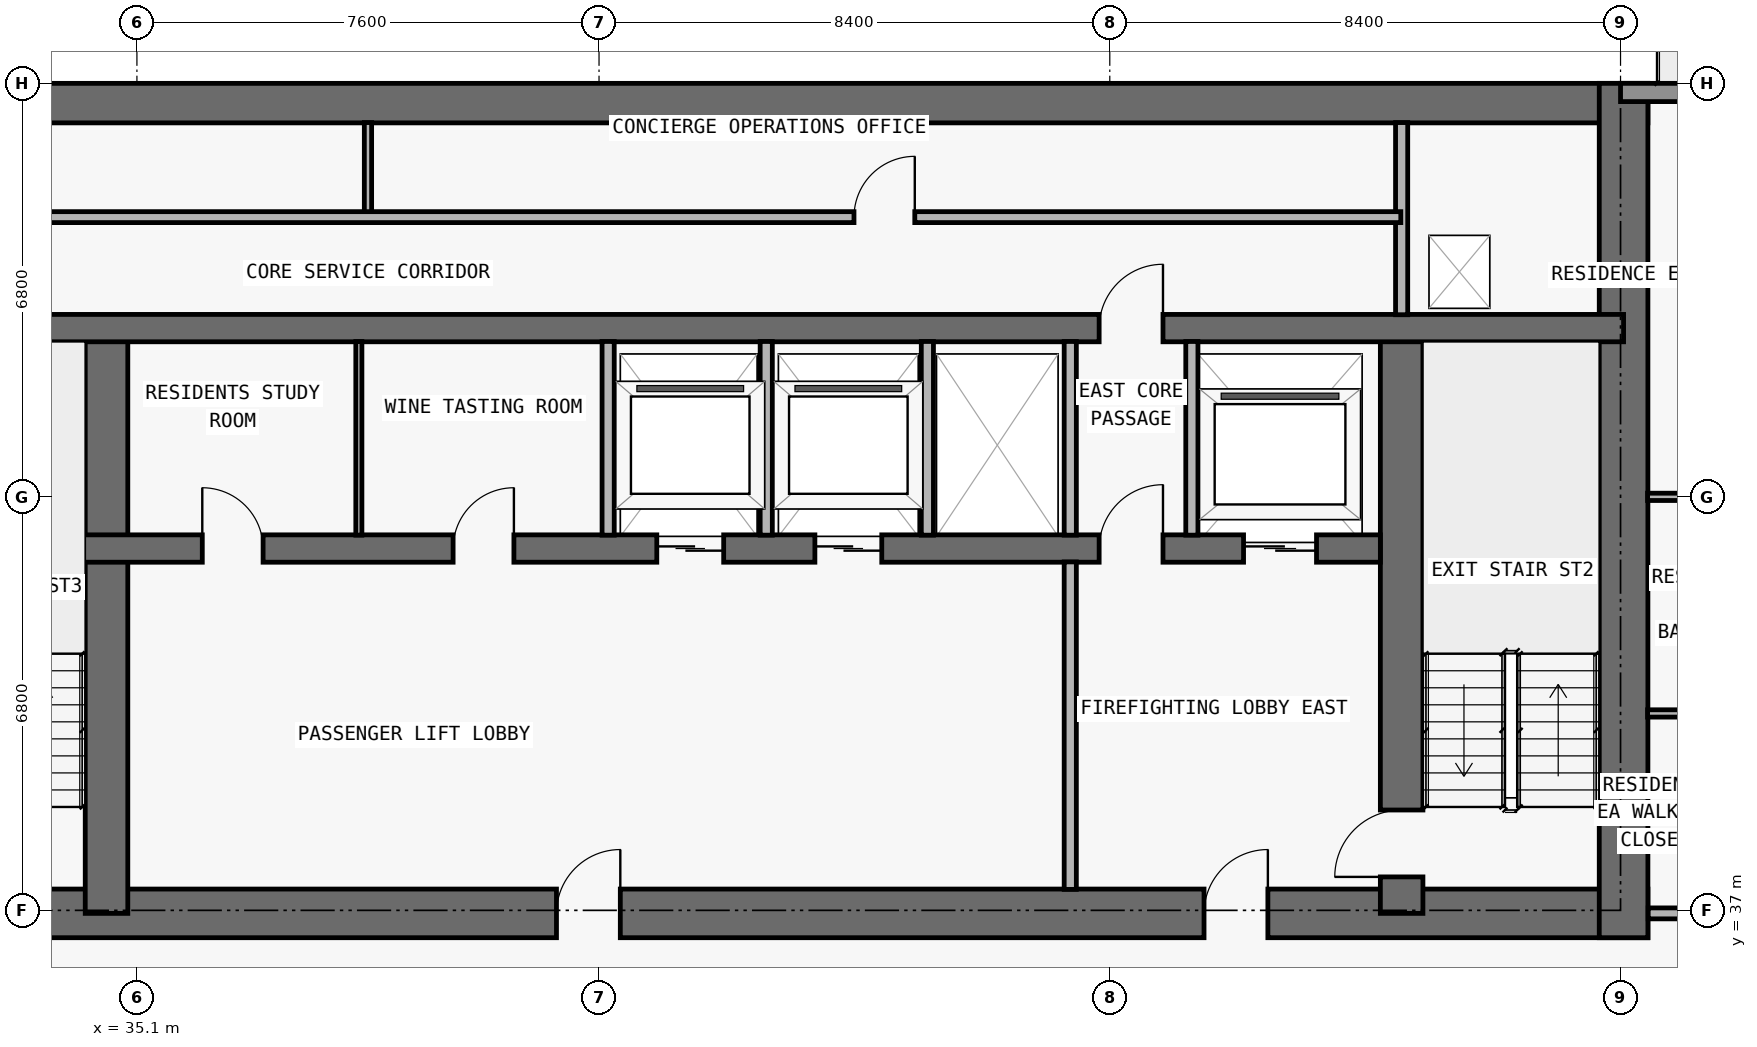
"""IFC4 building model, lengths in metres.
Left out: names, types, materials, properties, quantities, classifications, styles, units other than length and angle.
Written with IfcOpenShell. Run it as: python <this file> out.ifc"""

import sys

from ifc_helpers import new_model, si_unit, direction, frame, frame_2d, origin, place, context, subcontext, project, spatial, rectangle, extrude, element, fill, save


model = new_model("IFC4")
c1 = context("Model", 3, precision=1e-05, world=origin(), true_north=direction((0.0, 1.0)))
c2 = subcontext(c1, "Body", "Model", "MODEL_VIEW")
j1 = project(units=[si_unit("LENGTHUNIT", "METRE"), si_unit("PLANEANGLEUNIT", "RADIAN")], contexts=[c1])
p1 = place(None, origin())
s1 = spatial("IfcSite", under=j1, at=p1, CompositionType="ELEMENT")
p2 = place(p1, origin())
s2 = spatial("IfcBuilding", under=s1, at=p2, CompositionType="ELEMENT")
p3 = place(p2, frame((0.0, 0.0, 132.3)))
s3 = spatial("IfcBuildingStorey", under=s2, at=p3, CompositionType="ELEMENT", Elevation=132.3)
p4 = place(p3, frame((17.85, 36.95, 0.0), z_axis=(0.0, 0.0, 1.0), x_axis=(1.0, 0.0, 0.0)))
e1 = element("IfcWall", 1, at=p4, inside=s3, PredefinedType="SHEAR", context=c2, shape_type="SweptSolid", body=[
    extrude(rectangle(XDim=42.1, YDim=0.8, at=frame_2d((21.05, 0.0))), origin(), (0.0, 0.0, 1.0), 3.05),
])
p5 = place(p4, frame((14.45, 0.0, 0.0)))
e2 = element("IfcOpeningElement", 2, at=p5, cuts=e1, PredefinedType="OPENING", context=c2, shape_type="SweptSolid", body=[
    extrude(rectangle(XDim=1.1, YDim=2.15, at=frame_2d((0.55, 1.075))), frame((0.0, 0.41, 0.0), z_axis=(0.0, -1.0, 0.0), x_axis=(1.0, 0.0, 0.0)), (0.0, 0.0, 1.0), 0.82),
])
p6 = place(p4, frame((6.3, 0.0, 0.0)))
e3 = element("IfcOpeningElement", 3, at=p6, cuts=e1, PredefinedType="OPENING", context=c2, shape_type="SweptSolid", body=[
    extrude(rectangle(XDim=1.05, YDim=2.15, at=frame_2d((0.525, 1.075))), frame((0.0, 0.41, 0.0), z_axis=(0.0, -1.0, 0.0), x_axis=(1.0, 0.0, 0.0)), (0.0, 0.0, 1.0), 0.82),
])
p7 = place(p4, frame((34.8, 0.0, 0.0)))
e4 = element("IfcOpeningElement", 4, at=p7, cuts=e1, PredefinedType="OPENING", context=c2, shape_type="SweptSolid", body=[
    extrude(rectangle(XDim=1.05, YDim=2.15, at=frame_2d((0.525, 1.075))), frame((0.0, 0.41, 0.0), z_axis=(0.0, -1.0, 0.0), x_axis=(1.0, 0.0, 0.0)), (0.0, 0.0, 1.0), 0.82),
])
p8 = place(p4, frame((10.913, 0.0, 0.0)))
e5 = element("IfcOpeningElement", 5, at=p8, cuts=e1, PredefinedType="OPENING", context=c2, shape_type="SweptSolid", body=[
    extrude(rectangle(XDim=1.05, YDim=2.15, at=frame_2d((0.525, 1.075))), frame((0.0, 0.41, 0.0), z_axis=(0.0, -1.0, 0.0), x_axis=(1.0, 0.0, 0.0)), (0.0, 0.0, 1.0), 0.82),
])
p9 = place(p4, frame((24.15, 0.0, 0.0)))
e6 = element("IfcOpeningElement", 6, at=p9, cuts=e1, PredefinedType="OPENING", context=c2, shape_type="SweptSolid", body=[
    extrude(rectangle(XDim=1.05, YDim=2.15, at=frame_2d((0.525, 1.075))), frame((0.0, 0.41, 0.0), z_axis=(0.0, -1.0, 0.0), x_axis=(1.0, 0.0, 0.0)), (0.0, 0.0, 1.0), 0.82),
])
p10 = place(p3, frame((17.85, 50.275, 0.0), z_axis=(0.0, 0.0, 1.0), x_axis=(1.0, 0.0, 0.0)))
e7 = element("IfcWall", 7, at=p10, inside=s3, PredefinedType="SHEAR", context=c2, shape_type="SweptSolid", body=[
    extrude(rectangle(XDim=42.1, YDim=0.65, at=frame_2d((21.05, 0.0))), origin(), (0.0, 0.0, 1.0), 3.05),
])
p11 = place(p3, frame((59.55, 36.55, 0.0), z_axis=(0.0, 0.0, 1.0), x_axis=(0.0, 1.0, 0.0)))
e8 = element("IfcWall", 8, at=p11, inside=s3, PredefinedType="SHEAR", context=c2, shape_type="SweptSolid", body=[
    extrude(rectangle(XDim=14.05, YDim=0.8, at=frame_2d((7.025, 0.0))), origin(), (0.0, 0.0, 1.0), 3.05),
])
p12 = place(p3, frame((55.9, 36.95, 0.0), z_axis=(0.0, 0.0, 1.0), x_axis=(0.0, 1.0, 0.0)))
e9 = element("IfcWall", 9, at=p12, inside=s3, PredefinedType="SHEAR", context=c2, shape_type="SweptSolid", body=[
    extrude(rectangle(XDim=9.625, YDim=0.7, at=frame_2d((4.812, 0.0))), origin(), (0.0, 0.0, 1.0), 3.05),
])
p13 = place(p12, frame((0.6, 0.0, 0.0)))
e10 = element("IfcOpeningElement", 10, at=p13, cuts=e9, PredefinedType="OPENING", context=c2, shape_type="SweptSolid", body=[
    extrude(rectangle(XDim=1.1, YDim=2.15, at=frame_2d((0.55, 1.075))), frame((0.0, 0.36, 0.0), z_axis=(0.0, -1.0, 0.0), x_axis=(1.0, 0.0, 0.0)), (0.0, 0.0, 1.0), 0.72),
])
p14 = place(p3, frame((34.6, 36.95, 0.0), z_axis=(0.0, 0.0, 1.0), x_axis=(0.0, 1.0, 0.0)))
e11 = element("IfcWall", 11, at=p14, inside=s3, PredefinedType="SHEAR", context=c2, shape_type="SweptSolid", body=[
    extrude(rectangle(XDim=9.625, YDim=0.7, at=frame_2d((4.812, 0.0))), origin(), (0.0, 0.0, 1.0), 3.05),
])
p15 = place(p3, frame((22.25, 42.95, 0.0), z_axis=(0.0, 0.0, 1.0), x_axis=(1.0, 0.0, 0.0)))
e12 = element("IfcWall", 12, at=p15, inside=s3, PredefinedType="SHEAR", context=c2, shape_type="SweptSolid", body=[
    extrude(rectangle(XDim=33.3, YDim=0.45, at=frame_2d((16.65, 0.0))), origin(), (0.0, 0.0, 1.0), 3.05),
])
p16 = place(p15, frame((1.05, 0.0, 0.0)))
e13 = element("IfcOpeningElement", 13, at=p16, cuts=e12, PredefinedType="OPENING", context=c2, shape_type="SweptSolid", body=[
    extrude(rectangle(XDim=1.2, YDim=2.2, at=frame_2d((0.6, 1.1))), frame((0.0, 0.235, 0.0), z_axis=(0.0, -1.0, 0.0), x_axis=(1.0, 0.0, 0.0)), (0.0, 0.0, 1.0), 0.47),
])
p17 = place(p15, frame((31.05, 0.0, 0.0)))
e14 = element("IfcOpeningElement", 14, at=p17, cuts=e12, PredefinedType="OPENING", context=c2, shape_type="SweptSolid", body=[
    extrude(rectangle(XDim=1.2, YDim=2.2, at=frame_2d((0.6, 1.1))), frame((0.0, 0.235, 0.0), z_axis=(0.0, -1.0, 0.0), x_axis=(1.0, 0.0, 0.0)), (0.0, 0.0, 1.0), 0.47),
])
p18 = place(p15, frame((21.4, 0.0, 0.0)))
e15 = element("IfcOpeningElement", 15, at=p18, cuts=e12, PredefinedType="OPENING", context=c2, shape_type="SweptSolid", body=[
    extrude(rectangle(XDim=1.1, YDim=2.2, at=frame_2d((0.55, 1.1))), frame((0.0, 0.235, 0.0), z_axis=(0.0, -1.0, 0.0), x_axis=(1.0, 0.0, 0.0)), (0.0, 0.0, 1.0), 0.47),
])
p19 = place(p15, frame((24.0, 0.0, 0.0)))
e16 = element("IfcOpeningElement", 16, at=p19, cuts=e12, PredefinedType="OPENING", context=c2, shape_type="SweptSolid", body=[
    extrude(rectangle(XDim=1.1, YDim=2.2, at=frame_2d((0.55, 1.1))), frame((0.0, 0.235, 0.0), z_axis=(0.0, -1.0, 0.0), x_axis=(1.0, 0.0, 0.0)), (0.0, 0.0, 1.0), 0.47),
])
p20 = place(p15, frame((3.625, 0.0, 0.0)))
e17 = element("IfcOpeningElement", 17, at=p20, cuts=e12, PredefinedType="OPENING", context=c2, shape_type="SweptSolid", body=[
    extrude(rectangle(XDim=1.05, YDim=2.15, at=frame_2d((0.525, 1.075))), frame((0.0, 0.235, 0.0), z_axis=(0.0, -1.0, 0.0), x_axis=(1.0, 0.0, 0.0)), (0.0, 0.0, 1.0), 0.47),
])
p21 = place(p15, frame((28.675, 0.0, 0.0)))
e18 = element("IfcOpeningElement", 18, at=p21, cuts=e12, PredefinedType="OPENING", context=c2, shape_type="SweptSolid", body=[
    extrude(rectangle(XDim=1.05, YDim=2.15, at=frame_2d((0.525, 1.075))), frame((0.0, 0.235, 0.0), z_axis=(0.0, -1.0, 0.0), x_axis=(1.0, 0.0, 0.0)), (0.0, 0.0, 1.0), 0.47),
])
p22 = place(p15, frame((13.925, 0.0, 0.0)))
e19 = element("IfcOpeningElement", 19, at=p22, cuts=e12, PredefinedType="OPENING", context=c2, shape_type="SweptSolid", body=[
    extrude(rectangle(XDim=1.0, YDim=2.2, at=frame_2d((0.5, 1.1))), frame((0.0, 0.235, 0.0), z_axis=(0.0, -1.0, 0.0), x_axis=(1.0, 0.0, 0.0)), (0.0, 0.0, 1.0), 0.47),
])
p23 = place(p15, frame((18.05, 0.0, 0.0)))
e20 = element("IfcOpeningElement", 20, at=p23, cuts=e12, PredefinedType="OPENING", context=c2, shape_type="SweptSolid", body=[
    extrude(rectangle(XDim=1.0, YDim=2.2, at=frame_2d((0.5, 1.1))), frame((0.0, 0.235, 0.0), z_axis=(0.0, -1.0, 0.0), x_axis=(1.0, 0.0, 0.0)), (0.0, 0.0, 1.0), 0.47),
])
p24 = place(p3, frame((18.25, 46.575, 0.0), z_axis=(0.0, 0.0, 1.0), x_axis=(1.0, 0.0, 0.0)))
e21 = element("IfcWall", 21, at=p24, inside=s3, PredefinedType="SHEAR", context=c2, shape_type="SweptSolid", body=[
    extrude(rectangle(XDim=41.3, YDim=0.45, at=frame_2d((20.65, 0.0))), origin(), (0.0, 0.0, 1.0), 3.05),
])
p25 = place(p24, frame((7.625, 0.0, 0.0)))
e22 = element("IfcOpeningElement", 22, at=p25, cuts=e21, PredefinedType="OPENING", context=c2, shape_type="SweptSolid", body=[
    extrude(rectangle(XDim=1.05, YDim=2.15, at=frame_2d((0.525, 1.075))), frame((0.0, 0.235, 0.0), z_axis=(0.0, -1.0, 0.0), x_axis=(1.0, 0.0, 0.0)), (0.0, 0.0, 1.0), 0.47),
])
p26 = place(p24, frame((32.675, 0.0, 0.0)))
e23 = element("IfcOpeningElement", 23, at=p26, cuts=e21, PredefinedType="OPENING", context=c2, shape_type="SweptSolid", body=[
    extrude(rectangle(XDim=1.05, YDim=2.15, at=frame_2d((0.525, 1.075))), frame((0.0, 0.235, 0.0), z_axis=(0.0, -1.0, 0.0), x_axis=(1.0, 0.0, 0.0)), (0.0, 0.0, 1.0), 0.47),
])
p27 = place(p3, frame((59.5, 50.45, 0.0), z_axis=(0.0, 0.0, 1.0), x_axis=(1.0, 0.0, 0.0)))
e24 = element("IfcWall", 24, at=p27, inside=s3, PredefinedType="STANDARD", context=c2, shape_type="SweptSolid", body=[
    extrude(rectangle(XDim=10.6, YDim=0.3, at=frame_2d((5.3, 0.0))), origin(), (0.0, 0.0, 1.0), 3.05),
])
p28 = place(p27, frame((4.3, 0.0, 0.0)))
e25 = element("IfcOpeningElement", 25, at=p28, cuts=e24, PredefinedType="OPENING", context=c2, shape_type="SweptSolid", body=[
    extrude(rectangle(XDim=2.0, YDim=2.3, at=frame_2d((1.0, 1.15))), frame((0.0, 0.16, 0.0), z_axis=(0.0, -1.0, 0.0), x_axis=(1.0, 0.0, 0.0)), (0.0, 0.0, 1.0), 0.32),
])
p29 = place(p3, frame((38.75, 43.17, 0.0), z_axis=(0.0, 0.0, 1.0), x_axis=(0.0, 1.0, 0.0)))
e26 = element("IfcWall", 26, at=p29, inside=s3, PredefinedType="MOVABLE", context=c2, shape_type="SweptSolid", body=[
    extrude(rectangle(XDim=3.185, YDim=0.1, at=frame_2d((1.593, 0.0))), origin(), (0.0, 0.0, 1.0), 3.05),
])
p30 = place(p3, frame((38.9, 48.4, 0.0), z_axis=(0.0, 0.0, 1.0), x_axis=(0.0, 1.0, 0.0)))
e27 = element("IfcWall", 27, at=p30, inside=s3, PredefinedType="PARTITIONING", context=c2, shape_type="SweptSolid", body=[
    extrude(rectangle(XDim=1.555, YDim=0.12, at=frame_2d((0.778, 0.0))), origin(), (0.0, 0.0, 1.0), 3.05),
])
for number, where, z_axis, x_axis in (
    (28, (42.85, 43.17, 0.0), (0.0, 0.0, 1.0), (0.0, 1.0, 0.0)),
    (29, (45.45, 43.17, 0.0), (0.0, 0.0, 1.0), (0.0, 1.0, 0.0)),
    (30, (48.1, 43.17, 0.0), (0.0, 0.0, 1.0), (0.0, 1.0, 0.0)),
):
    element("IfcWall", number, at=place(p3, frame(where, z_axis=z_axis, x_axis=x_axis)), inside=s3, PredefinedType="PARTITIONING", context=c2, shape_type="SweptSolid", body=[
        extrude(rectangle(XDim=3.185, YDim=0.2, at=frame_2d((1.593, 0.0))), origin(), (0.0, 0.0, 1.0), 3.05),
    ])
p31 = place(p3, frame((50.45, 37.345, 0.0), z_axis=(0.0, 0.0, 1.0), x_axis=(0.0, 1.0, 0.0)))
e31 = element("IfcWall", 31, at=p31, inside=s3, PredefinedType="PARTITIONING", context=c2, shape_type="SweptSolid", body=[
    extrude(rectangle(XDim=5.385, YDim=0.2, at=frame_2d((2.692, 0.0))), origin(), (0.0, 0.0, 1.0), 3.05),
])
for number, where, z_axis, x_axis in (
    (32, (50.45, 43.17, 0.0), (0.0, 0.0, 1.0), (0.0, 1.0, 0.0)),
    (33, (52.45, 43.17, 0.0), (0.0, 0.0, 1.0), (0.0, 1.0, 0.0)),
):
    element("IfcWall", number, at=place(p3, frame(where, z_axis=z_axis, x_axis=x_axis)), inside=s3, PredefinedType="PARTITIONING", context=c2, shape_type="SweptSolid", body=[
        extrude(rectangle(XDim=3.185, YDim=0.2, at=frame_2d((1.593, 0.0))), origin(), (0.0, 0.0, 1.0), 3.05),
    ])
p32 = place(p3, frame((55.9, 46.795, 0.0), z_axis=(0.0, 0.0, 1.0), x_axis=(0.0, 1.0, 0.0)))
e34 = element("IfcWall", 34, at=p32, inside=s3, PredefinedType="PARTITIONING", context=c2, shape_type="SweptSolid", body=[
    extrude(rectangle(XDim=3.16, YDim=0.2, at=frame_2d((1.58, 0.0))), origin(), (0.0, 0.0, 1.0), 3.05),
])
p33 = place(p3, frame((59.955, 36.95, 0.0), z_axis=(0.0, 0.0, 1.0), x_axis=(1.0, 0.0, 0.0)))
e35 = element("IfcWall", 35, at=p33, inside=s3, PredefinedType="PARTITIONING", context=c2, shape_type="SweptSolid", body=[
    extrude(rectangle(XDim=10.145, YDim=0.18, at=frame_2d((5.073, 0.0))), origin(), (0.0, 0.0, 1.0), 3.05),
])
p34 = place(p33, frame((3.957, 0.0, 0.0)))
e36 = element("IfcOpeningElement", 36, at=p34, cuts=e35, PredefinedType="OPENING", context=c2, shape_type="SweptSolid", body=[
    extrude(rectangle(XDim=1.0, YDim=2.2, at=frame_2d((0.5, 1.1))), frame((0.0, 0.1, 0.0), z_axis=(0.0, -1.0, 0.0), x_axis=(1.0, 0.0, 0.0)), (0.0, 0.0, 1.0), 0.2),
])
p35 = place(p3, frame((59.945, 40.238, 0.0), z_axis=(0.0, 0.0, 1.0), x_axis=(1.0, 0.0, 0.0)))
e37 = element("IfcWall", 37, at=p35, inside=s3, PredefinedType="PARTITIONING", context=c2, shape_type="SweptSolid", body=[
    extrude(rectangle(XDim=2.255, YDim=0.12, at=frame_2d((1.127, 0.0))), origin(), (0.0, 0.0, 1.0), 3.05),
])
p36 = place(p3, frame((59.945, 43.8, 0.0), z_axis=(0.0, 0.0, 1.0), x_axis=(1.0, 0.0, 0.0)))
e38 = element("IfcWall", 38, at=p36, inside=s3, PredefinedType="PARTITIONING", context=c2, shape_type="SweptSolid", body=[
    extrude(rectangle(XDim=13.66, YDim=0.12, at=frame_2d((6.83, 0.0))), origin(), (0.0, 0.0, 1.0), 2.339),
])
p37 = place(p36, frame((4.017, 0.0, 0.0)))
e39 = element("IfcOpeningElement", 39, at=p37, cuts=e38, PredefinedType="OPENING", context=c2, shape_type="SweptSolid", body=[
    extrude(rectangle(XDim=0.9, YDim=2.15, at=frame_2d((0.45, 1.075))), frame((0.0, 0.07, 0.0), z_axis=(0.0, -1.0, 0.0), x_axis=(1.0, 0.0, 0.0)), (0.0, 0.0, 1.0), 0.14),
])
p38 = place(p36, frame((0.702, 0.0, 0.0)))
e40 = element("IfcOpeningElement", 40, at=p38, cuts=e38, PredefinedType="OPENING", context=c2, shape_type="SweptSolid", body=[
    extrude(rectangle(XDim=0.85, YDim=2.1, at=frame_2d((0.425, 1.05))), frame((0.0, 0.07, 0.0), z_axis=(0.0, -1.0, 0.0), x_axis=(1.0, 0.0, 0.0)), (0.0, 0.0, 1.0), 0.14),
])
p39 = place(p3, frame((21.9, 48.4, 0.0), z_axis=(0.0, 0.0, 1.0), x_axis=(1.0, 0.0, 0.0)))
e41 = element("IfcWall", 41, at=p39, inside=s3, PredefinedType="PARTITIONING", context=c2, shape_type="SweptSolid", body=[
    extrude(rectangle(XDim=33.986, YDim=0.18, at=frame_2d((16.993, 0.0))), origin(), (0.0, 0.0, 1.0), 3.05),
])
p40 = place(p39, frame((8.0, 0.0, 0.0)))
e42 = element("IfcOpeningElement", 42, at=p40, cuts=e41, PredefinedType="OPENING", context=c2, shape_type="SweptSolid", body=[
    extrude(rectangle(XDim=1.0, YDim=2.2, at=frame_2d((0.5, 1.1))), frame((0.0, 0.1, 0.0), z_axis=(0.0, -1.0, 0.0), x_axis=(1.0, 0.0, 0.0)), (0.0, 0.0, 1.0), 0.2),
])
p41 = place(p39, frame((24.993, 0.0, 0.0)))
e43 = element("IfcOpeningElement", 43, at=p41, cuts=e41, PredefinedType="OPENING", context=c2, shape_type="SweptSolid", body=[
    extrude(rectangle(XDim=1.0, YDim=2.2, at=frame_2d((0.5, 1.1))), frame((0.0, 0.1, 0.0), z_axis=(0.0, -1.0, 0.0), x_axis=(1.0, 0.0, 0.0)), (0.0, 0.0, 1.0), 0.2),
])
p42 = place(p17, origin())
e44 = element("IfcDoor", 44, at=p42, inside=s3, OperationType="DOUBLE_DOOR_SLIDING", PredefinedType="DOOR", context=c2, shape_type="SweptSolid", body=[
    extrude(rectangle(XDim=1.2, YDim=2.2, at=frame_2d((0.6, 1.1))), frame((0.0, 0.025, 0.0), z_axis=(0.0, -1.0, 0.0), x_axis=(1.0, 0.0, 0.0)), (0.0, 0.0, 1.0), 0.05),
])
fill(e14, e44)
p43 = place(p18, origin())
e45 = element("IfcDoor", 45, at=p43, inside=s3, OperationType="DOUBLE_DOOR_SLIDING", PredefinedType="DOOR", context=c2, shape_type="SweptSolid", body=[
    extrude(rectangle(XDim=1.1, YDim=2.2, at=frame_2d((0.55, 1.1))), frame((0.0, 0.025, 0.0), z_axis=(0.0, -1.0, 0.0), x_axis=(1.0, 0.0, 0.0)), (0.0, 0.0, 1.0), 0.05),
])
fill(e15, e45)
p44 = place(p19, origin())
e46 = element("IfcDoor", 46, at=p44, inside=s3, OperationType="DOUBLE_DOOR_SLIDING", PredefinedType="DOOR", context=c2, shape_type="SweptSolid", body=[
    extrude(rectangle(XDim=1.1, YDim=2.2, at=frame_2d((0.55, 1.1))), frame((0.0, 0.025, 0.0), z_axis=(0.0, -1.0, 0.0), x_axis=(1.0, 0.0, 0.0)), (0.0, 0.0, 1.0), 0.05),
])
fill(e16, e46)
p45 = place(p7, origin())
e47 = element("IfcDoor", 47, at=p45, inside=s3, OperationType="SINGLE_SWING_RIGHT", PredefinedType="DOOR", context=c2, shape_type="SweptSolid", body=[
    extrude(rectangle(XDim=1.05, YDim=2.15, at=frame_2d((0.525, 1.075))), frame((0.0, 0.025, 0.0), z_axis=(0.0, -1.0, 0.0), x_axis=(1.0, 0.0, 0.0)), (0.0, 0.0, 1.0), 0.05),
])
fill(e4, e47)
p46 = place(p13, origin())
e48 = element("IfcDoor", 48, at=p46, inside=s3, OperationType="SINGLE_SWING_LEFT", PredefinedType="DOOR", context=c2, shape_type="SweptSolid", body=[
    extrude(rectangle(XDim=1.1, YDim=2.15, at=frame_2d((0.55, 1.075))), frame((0.0, 0.025, 0.0), z_axis=(0.0, -1.0, 0.0), x_axis=(1.0, 0.0, 0.0)), (0.0, 0.0, 1.0), 0.05),
])
fill(e10, e48)
p47 = place(p21, origin())
e49 = element("IfcDoor", 49, at=p47, inside=s3, OperationType="SINGLE_SWING_RIGHT", PredefinedType="DOOR", context=c2, shape_type="SweptSolid", body=[
    extrude(rectangle(XDim=1.05, YDim=2.15, at=frame_2d((0.525, 1.075))), frame((0.0, 0.025, 0.0), z_axis=(0.0, -1.0, 0.0), x_axis=(1.0, 0.0, 0.0)), (0.0, 0.0, 1.0), 0.05),
])
fill(e18, e49)
p48 = place(p9, origin())
e50 = element("IfcDoor", 50, at=p48, inside=s3, OperationType="SINGLE_SWING_RIGHT", PredefinedType="DOOR", context=c2, shape_type="SweptSolid", body=[
    extrude(rectangle(XDim=1.05, YDim=2.15, at=frame_2d((0.525, 1.075))), frame((0.0, 0.025, 0.0), z_axis=(0.0, -1.0, 0.0), x_axis=(1.0, 0.0, 0.0)), (0.0, 0.0, 1.0), 0.05),
])
fill(e6, e50)
p49 = place(p22, origin())
e51 = element("IfcDoor", 51, at=p49, inside=s3, OperationType="SINGLE_SWING_LEFT", PredefinedType="DOOR", context=c2, shape_type="SweptSolid", body=[
    extrude(rectangle(XDim=1.0, YDim=2.2, at=frame_2d((0.5, 1.1))), frame((0.0, 0.025, 0.0), z_axis=(0.0, -1.0, 0.0), x_axis=(1.0, 0.0, 0.0)), (0.0, 0.0, 1.0), 0.05),
])
fill(e19, e51)
p50 = place(p23, origin())
e52 = element("IfcDoor", 52, at=p50, inside=s3, OperationType="SINGLE_SWING_RIGHT", PredefinedType="DOOR", context=c2, shape_type="SweptSolid", body=[
    extrude(rectangle(XDim=1.0, YDim=2.2, at=frame_2d((0.5, 1.1))), frame((0.0, 0.025, 0.0), z_axis=(0.0, -1.0, 0.0), x_axis=(1.0, 0.0, 0.0)), (0.0, 0.0, 1.0), 0.05),
])
fill(e20, e52)
p51 = place(p26, origin())
e53 = element("IfcDoor", 53, at=p51, inside=s3, OperationType="SINGLE_SWING_RIGHT", PredefinedType="DOOR", context=c2, shape_type="SweptSolid", body=[
    extrude(rectangle(XDim=1.05, YDim=2.15, at=frame_2d((0.525, 1.075))), frame((0.0, 0.025, 0.0), z_axis=(0.0, -1.0, 0.0), x_axis=(1.0, 0.0, 0.0)), (0.0, 0.0, 1.0), 0.05),
])
fill(e23, e53)
p52 = place(p41, origin())
e54 = element("IfcDoor", 54, at=p52, inside=s3, OperationType="SINGLE_SWING_RIGHT", PredefinedType="DOOR", context=c2, shape_type="SweptSolid", body=[
    extrude(rectangle(XDim=1.0, YDim=2.2, at=frame_2d((0.5, 1.1))), frame((0.0, 0.025, 0.0), z_axis=(0.0, -1.0, 0.0), x_axis=(1.0, 0.0, 0.0)), (0.0, 0.0, 1.0), 0.05),
])
fill(e43, e54)
save(model, sys.argv[1])
